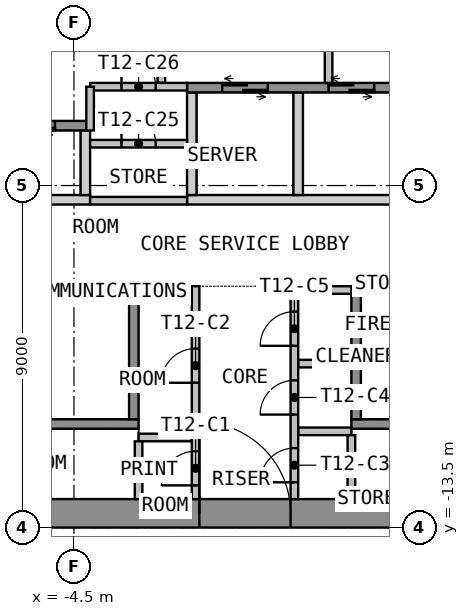
"""IFC4 building model, lengths in metres.
Left out: names, types, materials, properties, quantities, classifications, styles, units other than length and angle.
Written with IfcOpenShell. Run it as: python <this file> out.ifc"""

import sys

from ifc_helpers import new_model, si_unit, direction, frame, frame_2d, origin, place, context, subcontext, project, spatial, polyline, rectangle, outline, extrude, element, fill, save


model = new_model("IFC4")
c1 = context("Model", 3, precision=1e-05, world=origin(), true_north=direction((0.0, 1.0)))
c2 = subcontext(c1, "Body", "Model", "MODEL_VIEW")
j1 = project(units=[si_unit("LENGTHUNIT", "METRE"), si_unit("PLANEANGLEUNIT", "RADIAN")], contexts=[c1])
p1 = place(None, origin())
s1 = spatial("IfcSite", under=j1, at=p1, CompositionType="ELEMENT")
p2 = place(p1, origin())
s2 = spatial("IfcBuilding", under=s1, at=p2, CompositionType="ELEMENT")
p3 = place(p2, frame((0.0, 0.0, 167.7)))
s3 = spatial("IfcBuildingStorey", under=s2, at=p3, CompositionType="ELEMENT", Elevation=167.7)
p4 = place(p3, frame((-15.75, -13.125, 0.0), z_axis=(0.0, 0.0, 1.0), x_axis=(1.0, 0.0, 0.0)))
e1 = element("IfcWall", 1, at=p4, inside=s3, PredefinedType="SHEAR", context=c2, shape_type="SweptSolid", body=[
    extrude(rectangle(XDim=31.5, YDim=0.75, at=frame_2d((15.75, 0.0))), origin(), (0.0, 0.0, 1.0), 3.575),
])
p5 = place(p4, frame((14.55, 0.0, 0.0)))
e2 = element("IfcOpeningElement", 2, at=p5, cuts=e1, PredefinedType="OPENING", context=c2, shape_type="SweptSolid", body=[
    extrude(rectangle(XDim=2.4, YDim=2.1, at=frame_2d((1.2, 1.05))), frame((0.0, 0.385, 0.0), z_axis=(0.0, -1.0, 0.0), x_axis=(1.0, 0.0, 0.0)), (0.0, 0.0, 1.0), 0.77),
])
p6 = place(p4, frame((3.3, 0.0, 0.0)))
e3 = element("IfcOpeningElement", 3, at=p6, cuts=e1, PredefinedType="OPENING", context=c2, shape_type="SweptSolid", body=[
    extrude(rectangle(XDim=1.2, YDim=2.1, at=frame_2d((0.6, 1.05))), frame((0.0, 0.385, 0.0), z_axis=(0.0, -1.0, 0.0), x_axis=(1.0, 0.0, 0.0)), (0.0, 0.0, 1.0), 0.77),
])
p7 = place(p4, frame((27.0, 0.0, 0.0)))
e4 = element("IfcOpeningElement", 4, at=p7, cuts=e1, PredefinedType="OPENING", context=c2, shape_type="SweptSolid", body=[
    extrude(rectangle(XDim=1.2, YDim=2.1, at=frame_2d((0.6, 1.05))), frame((0.0, 0.385, 0.0), z_axis=(0.0, -1.0, 0.0), x_axis=(1.0, 0.0, 0.0)), (0.0, 0.0, 1.0), 0.77),
])
p8 = place(p3, origin())
e5 = element("IfcWall", 5, at=p8, inside=s3, PredefinedType="SHEAR", context=c2, shape_type="SweptSolid", body=[
    extrude(outline(polyline([(-12.9, -5.0), (-4.075, -5.0), (-4.075, -4.75), (-12.9, -4.75), (-12.9, -5.0)])), origin(), (0.0, 0.0, 1.0), 3.575),
])
p9 = place(p3, origin())
e6 = element("IfcWall", 6, at=p9, inside=s3, PredefinedType="SHEAR", context=c2, shape_type="SweptSolid", body=[
    extrude(outline(polyline([(-1.525, -5.0), (12.9, -5.0), (12.9, -4.75), (-1.525, -4.75), (-1.525, -5.0)])), origin(), (0.0, 0.0, 1.0), 3.575),
])
p10 = place(p3, origin())
e7 = element("IfcWall", 7, at=p10, inside=s3, PredefinedType="SHEAR", context=c2, shape_type="SweptSolid", body=[
    extrude(outline(polyline([(-4.325, -4.75), (-4.075, -4.75), (-4.075, -3.05), (-4.325, -3.05), (-4.325, -4.75)])), origin(), (0.0, 0.0, 1.0), 3.575),
])
p11 = place(p3, origin())
e8 = element("IfcWall", 8, at=p11, inside=s3, PredefinedType="SHEAR", context=c2, shape_type="SweptSolid", body=[
    extrude(outline(polyline([(-1.525, -4.75), (-1.275, -4.75), (-1.275, -2.05), (-1.525, -2.05), (-1.525, -4.75)])), origin(), (0.0, 0.0, 1.0), 3.575),
])
p12 = place(p3, origin())
e9 = element("IfcWall", 9, at=p12, inside=s3, PredefinedType="SHEAR", context=c2, shape_type="SweptSolid", body=[
    extrude(outline(polyline([(1.275, -4.75), (1.525, -4.75), (1.525, -2.05), (1.275, -2.05), (1.275, -4.75)])), origin(), (0.0, 0.0, 1.0), 3.575),
])
p13 = place(p3, frame((-12.9, -2.925, 0.0), z_axis=(0.0, 0.0, 1.0), x_axis=(1.0, 0.0, 0.0)))
e10 = element("IfcWall", 10, at=p13, inside=s3, PredefinedType="SHEAR", context=c2, shape_type="SweptSolid", body=[
    extrude(rectangle(XDim=8.825, YDim=0.25, at=frame_2d((4.413, 0.0))), origin(), (0.0, 0.0, 1.0), 3.575),
])
p14 = place(p13, frame((1.1, 0.0, 0.0)))
e11 = element("IfcOpeningElement", 11, at=p14, cuts=e10, PredefinedType="OPENING", context=c2, shape_type="SweptSolid", body=[
    extrude(rectangle(XDim=1.2, YDim=2.1, at=frame_2d((0.6, 1.05))), frame((0.0, 0.135, 0.0), z_axis=(0.0, -1.0, 0.0), x_axis=(1.0, 0.0, 0.0)), (0.0, 0.0, 1.0), 0.27),
])
p15 = place(p13, frame((3.9, 0.0, 0.0)))
e12 = element("IfcOpeningElement", 12, at=p15, cuts=e10, PredefinedType="OPENING", context=c2, shape_type="SweptSolid", body=[
    extrude(rectangle(XDim=1.2, YDim=2.1, at=frame_2d((0.6, 1.05))), frame((0.0, 0.135, 0.0), z_axis=(0.0, -1.0, 0.0), x_axis=(1.0, 0.0, 0.0)), (0.0, 0.0, 1.0), 0.27),
])
p16 = place(p13, frame((6.7, 0.0, 0.0)))
e13 = element("IfcOpeningElement", 13, at=p16, cuts=e10, PredefinedType="OPENING", context=c2, shape_type="SweptSolid", body=[
    extrude(rectangle(XDim=1.2, YDim=2.1, at=frame_2d((0.6, 1.05))), frame((0.0, 0.135, 0.0), z_axis=(0.0, -1.0, 0.0), x_axis=(1.0, 0.0, 0.0)), (0.0, 0.0, 1.0), 0.27),
])
p17 = place(p3, frame((-1.525, -1.925, 0.0), z_axis=(0.0, 0.0, 1.0), x_axis=(1.0, 0.0, 0.0)))
e14 = element("IfcWall", 14, at=p17, inside=s3, PredefinedType="SHEAR", context=c2, shape_type="SweptSolid", body=[
    extrude(rectangle(XDim=14.425, YDim=0.25, at=frame_2d((7.212, 0.0))), origin(), (0.0, 0.0, 1.0), 3.575),
])
p18 = place(p17, frame((0.925, 0.0, 0.0)))
e15 = element("IfcOpeningElement", 15, at=p18, cuts=e14, PredefinedType="OPENING", context=c2, shape_type="SweptSolid", body=[
    extrude(rectangle(XDim=1.2, YDim=2.1, at=frame_2d((0.6, 1.05))), frame((0.0, 0.135, 0.0), z_axis=(0.0, -1.0, 0.0), x_axis=(1.0, 0.0, 0.0)), (0.0, 0.0, 1.0), 0.27),
])
p19 = place(p17, frame((3.725, 0.0, 0.0)))
e16 = element("IfcOpeningElement", 16, at=p19, cuts=e14, PredefinedType="OPENING", context=c2, shape_type="SweptSolid", body=[
    extrude(rectangle(XDim=1.2, YDim=2.1, at=frame_2d((0.6, 1.05))), frame((0.0, 0.135, 0.0), z_axis=(0.0, -1.0, 0.0), x_axis=(1.0, 0.0, 0.0)), (0.0, 0.0, 1.0), 0.27),
])
p20 = place(p3, frame((-2.2, -1.8, 0.0), z_axis=(0.0, 0.0, 1.0), x_axis=(0.0, 1.0, 0.0)))
e17 = element("IfcWall", 17, at=p20, inside=s3, PredefinedType="PARTITIONING", context=c2, shape_type="SweptSolid", body=[
    extrude(rectangle(XDim=3.6, YDim=0.2, at=frame_2d((1.8, 0.0))), origin(), (0.0, 0.0, 1.0), 3.575),
])
p21 = place(p20, frame((1.2, 0.0, 0.0)))
e18 = element("IfcOpeningElement", 18, at=p21, cuts=e17, PredefinedType="OPENING", context=c2, shape_type="SweptSolid", body=[
    extrude(rectangle(XDim=1.2, YDim=2.1, at=frame_2d((0.6, 1.05))), frame((0.0, 0.11, 0.0), z_axis=(0.0, -1.0, 0.0), x_axis=(1.0, 0.0, 0.0)), (0.0, 0.0, 1.0), 0.22),
])
p22 = place(p3, frame((2.2, -1.8, 0.0), z_axis=(0.0, 0.0, 1.0), x_axis=(0.0, 1.0, 0.0)))
e19 = element("IfcWall", 19, at=p22, inside=s3, PredefinedType="PARTITIONING", context=c2, shape_type="SweptSolid", body=[
    extrude(rectangle(XDim=3.6, YDim=0.2, at=frame_2d((1.8, 0.0))), origin(), (0.0, 0.0, 1.0), 3.575),
])
p23 = place(p22, frame((1.2, 0.0, 0.0)))
e20 = element("IfcOpeningElement", 20, at=p23, cuts=e19, PredefinedType="OPENING", context=c2, shape_type="SweptSolid", body=[
    extrude(rectangle(XDim=1.2, YDim=2.1, at=frame_2d((0.6, 1.05))), frame((0.0, 0.11, 0.0), z_axis=(0.0, -1.0, 0.0), x_axis=(1.0, 0.0, 0.0)), (0.0, 0.0, 1.0), 0.22),
])
p24 = place(p3, frame((-12.9, -10.775, 0.0), z_axis=(0.0, 0.0, 1.0), x_axis=(1.0, 0.0, 0.0)))
e21 = element("IfcWall", 21, at=p24, inside=s3, PredefinedType="SHEAR", context=c2, shape_type="SweptSolid", body=[
    extrude(rectangle(XDim=10.1, YDim=0.25, at=frame_2d((5.05, 0.0))), origin(), (0.0, 0.0, 1.0), 3.575),
])
p25 = place(p24, frame((0.45, 0.0, 0.0)))
e22 = element("IfcOpeningElement", 22, at=p25, cuts=e21, PredefinedType="OPENING", context=c2, shape_type="SweptSolid", body=[
    extrude(rectangle(XDim=1.2, YDim=2.1, at=frame_2d((0.6, 1.05))), frame((0.0, 0.135, 0.0), z_axis=(0.0, -1.0, 0.0), x_axis=(1.0, 0.0, 0.0)), (0.0, 0.0, 1.0), 0.27),
])
p26 = place(p3, frame((-12.9, -7.275, 0.0), z_axis=(0.0, 0.0, 1.0), x_axis=(1.0, 0.0, 0.0)))
e23 = element("IfcWall", 23, at=p26, inside=s3, PredefinedType="SHEAR", context=c2, shape_type="SweptSolid", body=[
    extrude(rectangle(XDim=10.1, YDim=0.25, at=frame_2d((5.05, 0.0))), origin(), (0.0, 0.0, 1.0), 3.575),
])
p27 = place(p26, frame((0.45, 0.0, 0.0)))
e24 = element("IfcOpeningElement", 24, at=p27, cuts=e23, PredefinedType="OPENING", context=c2, shape_type="SweptSolid", body=[
    extrude(rectangle(XDim=1.2, YDim=2.1, at=frame_2d((0.6, 1.05))), frame((0.0, 0.135, 0.0), z_axis=(0.0, -1.0, 0.0), x_axis=(1.0, 0.0, 0.0)), (0.0, 0.0, 1.0), 0.27),
])
p28 = place(p3, frame((-2.925, -10.65, 0.0), z_axis=(0.0, 0.0, 1.0), x_axis=(0.0, 1.0, 0.0)))
e25 = element("IfcWall", 25, at=p28, inside=s3, PredefinedType="SHEAR", context=c2, shape_type="SweptSolid", body=[
    extrude(rectangle(XDim=3.25, YDim=0.25, at=frame_2d((1.625, 0.0))), origin(), (0.0, 0.0, 1.0), 3.575),
])
p29 = place(p3, frame((2.8, -10.775, 0.0), z_axis=(0.0, 0.0, 1.0), x_axis=(1.0, 0.0, 0.0)))
e26 = element("IfcWall", 26, at=p29, inside=s3, PredefinedType="SHEAR", context=c2, shape_type="SweptSolid", body=[
    extrude(rectangle(XDim=10.1, YDim=0.25, at=frame_2d((5.05, 0.0))), origin(), (0.0, 0.0, 1.0), 3.575),
])
p30 = place(p29, frame((8.45, 0.0, 0.0)))
e27 = element("IfcOpeningElement", 27, at=p30, cuts=e26, PredefinedType="OPENING", context=c2, shape_type="SweptSolid", body=[
    extrude(rectangle(XDim=1.2, YDim=2.1, at=frame_2d((0.6, 1.05))), frame((0.0, 0.135, 0.0), z_axis=(0.0, -1.0, 0.0), x_axis=(1.0, 0.0, 0.0)), (0.0, 0.0, 1.0), 0.27),
])
p31 = place(p3, frame((2.8, -7.275, 0.0), z_axis=(0.0, 0.0, 1.0), x_axis=(1.0, 0.0, 0.0)))
e28 = element("IfcWall", 28, at=p31, inside=s3, PredefinedType="SHEAR", context=c2, shape_type="SweptSolid", body=[
    extrude(rectangle(XDim=10.1, YDim=0.25, at=frame_2d((5.05, 0.0))), origin(), (0.0, 0.0, 1.0), 3.575),
])
p32 = place(p31, frame((8.45, 0.0, 0.0)))
e29 = element("IfcOpeningElement", 29, at=p32, cuts=e28, PredefinedType="OPENING", context=c2, shape_type="SweptSolid", body=[
    extrude(rectangle(XDim=1.2, YDim=2.1, at=frame_2d((0.6, 1.05))), frame((0.0, 0.135, 0.0), z_axis=(0.0, -1.0, 0.0), x_axis=(1.0, 0.0, 0.0)), (0.0, 0.0, 1.0), 0.27),
])
p33 = place(p3, frame((2.925, -10.65, 0.0), z_axis=(0.0, 0.0, 1.0), x_axis=(0.0, 1.0, 0.0)))
e30 = element("IfcWall", 30, at=p33, inside=s3, PredefinedType="SHEAR", context=c2, shape_type="SweptSolid", body=[
    extrude(rectangle(XDim=3.25, YDim=0.25, at=frame_2d((1.625, 0.0))), origin(), (0.0, 0.0, 1.0), 3.575),
])
for number, where, z_axis, x_axis in (
    (31, (-2.8, -7.25, 0.0), (0.0, 0.0, 1.0), (1.0, 0.0, 0.0)),
    (32, (-2.8, -11.13, 0.0), (0.0, 0.0, 1.0), (1.0, 0.0, 0.0)),
    (33, (1.4, -7.25, 0.0), (0.0, 0.0, 1.0), (1.0, 0.0, 0.0)),
    (34, (1.4, -9.186, 0.0), (0.0, 0.0, 1.0), (1.0, 0.0, 0.0)),
    (35, (1.4, -10.968, 0.0), (0.0, 0.0, 1.0), (1.0, 0.0, 0.0)),
):
    element("IfcWall", number, at=place(p3, frame(where, z_axis=z_axis, x_axis=x_axis)), inside=s3, PredefinedType="PARTITIONING", context=c2, shape_type="SweptSolid", body=[
        extrude(rectangle(XDim=1.4, YDim=0.2, at=frame_2d((0.7, 0.0))), origin(), (0.0, 0.0, 1.0), 3.575),
    ])
p34 = place(p3, frame((-1.3, -12.75, 0.0), z_axis=(0.0, 0.0, 1.0), x_axis=(0.0, 1.0, 0.0)))
e36 = element("IfcWall", 36, at=p34, inside=s3, PredefinedType="PARTITIONING", context=c2, shape_type="SweptSolid", body=[
    extrude(rectangle(XDim=5.6, YDim=0.2, at=frame_2d((2.8, 0.0))), origin(), (0.0, 0.0, 1.0), 3.575),
])
p35 = place(p34, frame((0.36, 0.0, 0.0)))
e37 = element("IfcOpeningElement", 37, at=p35, cuts=e36, PredefinedType="OPENING", context=c2, shape_type="SweptSolid", body=[
    extrude(rectangle(XDim=0.9, YDim=2.1, at=frame_2d((0.45, 1.05))), frame((0.0, 0.11, 0.0), z_axis=(0.0, -1.0, 0.0), x_axis=(1.0, 0.0, 0.0)), (0.0, 0.0, 1.0), 0.22),
])
p36 = place(p34, frame((3.06, 0.0, 0.0)))
e38 = element("IfcOpeningElement", 38, at=p36, cuts=e36, PredefinedType="OPENING", context=c2, shape_type="SweptSolid", body=[
    extrude(rectangle(XDim=0.9, YDim=2.1, at=frame_2d((0.45, 1.05))), frame((0.0, 0.11, 0.0), z_axis=(0.0, -1.0, 0.0), x_axis=(1.0, 0.0, 0.0)), (0.0, 0.0, 1.0), 0.22),
])
p37 = place(p3, frame((1.3, -12.75, 0.0), z_axis=(0.0, 0.0, 1.0), x_axis=(0.0, 1.0, 0.0)))
e39 = element("IfcWall", 39, at=p37, inside=s3, PredefinedType="PARTITIONING", context=c2, shape_type="SweptSolid", body=[
    extrude(rectangle(XDim=5.6, YDim=0.2, at=frame_2d((2.8, 0.0))), origin(), (0.0, 0.0, 1.0), 3.575),
])
p38 = place(p37, frame((0.441, 0.0, 0.0)))
e40 = element("IfcOpeningElement", 40, at=p38, cuts=e39, PredefinedType="OPENING", context=c2, shape_type="SweptSolid", body=[
    extrude(rectangle(XDim=0.9, YDim=2.1, at=frame_2d((0.45, 1.05))), frame((0.0, 0.11, 0.0), z_axis=(0.0, -1.0, 0.0), x_axis=(1.0, 0.0, 0.0)), (0.0, 0.0, 1.0), 0.22),
])
p39 = place(p37, frame((2.223, 0.0, 0.0)))
e41 = element("IfcOpeningElement", 41, at=p39, cuts=e39, PredefinedType="OPENING", context=c2, shape_type="SweptSolid", body=[
    extrude(rectangle(XDim=0.9, YDim=2.1, at=frame_2d((0.45, 1.05))), frame((0.0, 0.11, 0.0), z_axis=(0.0, -1.0, 0.0), x_axis=(1.0, 0.0, 0.0)), (0.0, 0.0, 1.0), 0.22),
])
p40 = place(p37, frame((4.032, 0.0, 0.0)))
e42 = element("IfcOpeningElement", 42, at=p40, cuts=e39, PredefinedType="OPENING", context=c2, shape_type="SweptSolid", body=[
    extrude(rectangle(XDim=0.9, YDim=2.1, at=frame_2d((0.45, 1.05))), frame((0.0, 0.11, 0.0), z_axis=(0.0, -1.0, 0.0), x_axis=(1.0, 0.0, 0.0)), (0.0, 0.0, 1.0), 0.22),
])
p41 = place(p3, frame((-4.075, -3.4, 0.0), z_axis=(0.0, 0.0, 1.0), x_axis=(1.0, 0.0, 0.0)))
e43 = element("IfcWall", 43, at=p41, inside=s3, PredefinedType="PARTITIONING", context=c2, shape_type="SweptSolid", body=[
    extrude(rectangle(XDim=2.55, YDim=0.2, at=frame_2d((1.275, 0.0))), origin(), (0.0, 0.0, 1.0), 3.575),
])
p42 = place(p41, frame((0.825, 0.0, 0.0)))
e44 = element("IfcOpeningElement", 44, at=p42, cuts=e43, PredefinedType="OPENING", context=c2, shape_type="SweptSolid", body=[
    extrude(rectangle(XDim=0.9, YDim=2.1, at=frame_2d((0.45, 1.05))), frame((0.0, 0.11, 0.0), z_axis=(0.0, -1.0, 0.0), x_axis=(1.0, 0.0, 0.0)), (0.0, 0.0, 1.0), 0.22),
])
p43 = place(p3, frame((-4.075, -1.9, 0.0), z_axis=(0.0, 0.0, 1.0), x_axis=(1.0, 0.0, 0.0)))
e45 = element("IfcWall", 45, at=p43, inside=s3, PredefinedType="PARTITIONING", context=c2, shape_type="SweptSolid", body=[
    extrude(rectangle(XDim=2.55, YDim=0.2, at=frame_2d((1.275, 0.0))), origin(), (0.0, 0.0, 1.0), 3.575),
])
p44 = place(p43, frame((0.825, 0.0, 0.0)))
e46 = element("IfcOpeningElement", 46, at=p44, cuts=e45, PredefinedType="OPENING", context=c2, shape_type="SweptSolid", body=[
    extrude(rectangle(XDim=0.9, YDim=2.1, at=frame_2d((0.45, 1.05))), frame((0.0, 0.11, 0.0), z_axis=(0.0, -1.0, 0.0), x_axis=(1.0, 0.0, 0.0)), (0.0, 0.0, 1.0), 0.22),
])
p45 = place(p3, frame((-4.075, -4.9, 0.0), z_axis=(0.0, 0.0, 1.0), x_axis=(1.0, 0.0, 0.0)))
e47 = element("IfcWall", 47, at=p45, inside=s3, PredefinedType="PARTITIONING", context=c2, shape_type="SweptSolid", body=[
    extrude(rectangle(XDim=2.55, YDim=0.2, at=frame_2d((1.275, 0.0))), origin(), (0.0, 0.0, 1.0), 3.575),
])
p46 = place(p3, frame((-4.075, -1.9, 0.0), z_axis=(0.0, 0.0, 1.0), x_axis=(0.0, -1.0, 0.0)))
e48 = element("IfcWall", 48, at=p46, inside=s3, PredefinedType="PARTITIONING", context=c2, shape_type="SweptSolid", body=[
    extrude(rectangle(XDim=1.15, YDim=0.2, at=frame_2d((0.575, 0.0))), origin(), (0.0, 0.0, 1.0), 3.575),
])
p47 = place(p3, frame((-2.8, -12.749, 0.0), z_axis=(0.0, 0.0, 1.0), x_axis=(0.0, 1.0, 0.0)))
e49 = element("IfcWall", 49, at=p47, inside=s3, PredefinedType="PARTITIONING", context=c2, shape_type="SweptSolid", body=[
    extrude(rectangle(XDim=1.518, YDim=0.2, at=frame_2d((0.759, 0.0))), origin(), (0.0, 0.0, 1.0), 3.575),
])
p48 = place(p3, frame((2.8, -12.749, 0.0), z_axis=(0.0, 0.0, 1.0), x_axis=(0.0, 1.0, 0.0)))
e50 = element("IfcWall", 50, at=p48, inside=s3, PredefinedType="PARTITIONING", context=c2, shape_type="SweptSolid", body=[
    extrude(rectangle(XDim=1.68, YDim=0.2, at=frame_2d((0.84, 0.0))), origin(), (0.0, 0.0, 1.0), 3.575),
])
p49 = place(p5, origin())
e51 = element("IfcDoor", 51, at=p49, inside=s3, OperationType="DOUBLE_DOOR_DOUBLE_SWING", PredefinedType="DOOR", context=c2, shape_type="SweptSolid", body=[
    extrude(rectangle(XDim=2.4, YDim=2.1, at=frame_2d((1.2, 1.05))), frame((0.0, 0.025, 0.0), z_axis=(0.0, -1.0, 0.0), x_axis=(1.0, 0.0, 0.0)), (0.0, 0.0, 1.0), 0.05),
])
fill(e2, e51)
p50 = place(p16, origin())
e52 = element("IfcDoor", 52, at=p50, inside=s3, OperationType="DOUBLE_DOOR_SLIDING", PredefinedType="DOOR", context=c2, shape_type="SweptSolid", body=[
    extrude(rectangle(XDim=1.2, YDim=2.1, at=frame_2d((0.6, 1.05))), frame((0.0, 0.025, 0.0), z_axis=(0.0, -1.0, 0.0), x_axis=(1.0, 0.0, 0.0)), (0.0, 0.0, 1.0), 0.05),
])
fill(e13, e52)
p51 = place(p18, origin())
e53 = element("IfcDoor", 53, at=p51, inside=s3, OperationType="DOUBLE_DOOR_SLIDING", PredefinedType="DOOR", context=c2, shape_type="SweptSolid", body=[
    extrude(rectangle(XDim=1.2, YDim=2.1, at=frame_2d((0.6, 1.05))), frame((0.0, 0.025, 0.0), z_axis=(0.0, -1.0, 0.0), x_axis=(1.0, 0.0, 0.0)), (0.0, 0.0, 1.0), 0.05),
])
fill(e15, e53)
p52 = place(p19, origin())
e54 = element("IfcDoor", 54, at=p52, inside=s3, OperationType="DOUBLE_DOOR_SLIDING", PredefinedType="DOOR", context=c2, shape_type="SweptSolid", body=[
    extrude(rectangle(XDim=1.2, YDim=2.1, at=frame_2d((0.6, 1.05))), frame((0.0, 0.025, 0.0), z_axis=(0.0, -1.0, 0.0), x_axis=(1.0, 0.0, 0.0)), (0.0, 0.0, 1.0), 0.05),
])
fill(e16, e54)
p53 = place(p35, origin())
e55 = element("IfcDoor", 55, at=p53, inside=s3, OperationType="SINGLE_SWING_LEFT", PredefinedType="DOOR", context=c2, shape_type="SweptSolid", body=[
    extrude(rectangle(XDim=0.9, YDim=2.1, at=frame_2d((0.45, 1.05))), frame((0.0, 0.025, 0.0), z_axis=(0.0, -1.0, 0.0), x_axis=(1.0, 0.0, 0.0)), (0.0, 0.0, 1.0), 0.05),
])
fill(e37, e55)
p54 = place(p36, origin())
e56 = element("IfcDoor", 56, at=p54, inside=s3, OperationType="SINGLE_SWING_LEFT", PredefinedType="DOOR", context=c2, shape_type="SweptSolid", body=[
    extrude(rectangle(XDim=0.9, YDim=2.1, at=frame_2d((0.45, 1.05))), frame((0.0, 0.025, 0.0), z_axis=(0.0, -1.0, 0.0), x_axis=(1.0, 0.0, 0.0)), (0.0, 0.0, 1.0), 0.05),
])
fill(e38, e56)
p55 = place(p38, origin())
e57 = element("IfcDoor", 57, at=p55, inside=s3, OperationType="SINGLE_SWING_LEFT", PredefinedType="DOOR", context=c2, shape_type="SweptSolid", body=[
    extrude(rectangle(XDim=0.9, YDim=2.1, at=frame_2d((0.45, 1.05))), frame((0.0, 0.025, 0.0), z_axis=(0.0, -1.0, 0.0), x_axis=(1.0, 0.0, 0.0)), (0.0, 0.0, 1.0), 0.05),
])
fill(e40, e57)
p56 = place(p39, origin())
e58 = element("IfcDoor", 58, at=p56, inside=s3, OperationType="SINGLE_SWING_LEFT", PredefinedType="DOOR", context=c2, shape_type="SweptSolid", body=[
    extrude(rectangle(XDim=0.9, YDim=2.1, at=frame_2d((0.45, 1.05))), frame((0.0, 0.025, 0.0), z_axis=(0.0, -1.0, 0.0), x_axis=(1.0, 0.0, 0.0)), (0.0, 0.0, 1.0), 0.05),
])
fill(e41, e58)
p57 = place(p40, origin())
e59 = element("IfcDoor", 59, at=p57, inside=s3, OperationType="SINGLE_SWING_LEFT", PredefinedType="DOOR", context=c2, shape_type="SweptSolid", body=[
    extrude(rectangle(XDim=0.9, YDim=2.1, at=frame_2d((0.45, 1.05))), frame((0.0, 0.025, 0.0), z_axis=(0.0, -1.0, 0.0), x_axis=(1.0, 0.0, 0.0)), (0.0, 0.0, 1.0), 0.05),
])
fill(e42, e59)
p58 = place(p42, origin())
e60 = element("IfcDoor", 60, at=p58, inside=s3, OperationType="SINGLE_SWING_LEFT", PredefinedType="DOOR", context=c2, shape_type="SweptSolid", body=[
    extrude(rectangle(XDim=0.9, YDim=2.1, at=frame_2d((0.45, 1.05))), frame((0.0, 0.025, 0.0), z_axis=(0.0, -1.0, 0.0), x_axis=(1.0, 0.0, 0.0)), (0.0, 0.0, 1.0), 0.05),
])
fill(e44, e60)
p59 = place(p44, origin())
e61 = element("IfcDoor", 61, at=p59, inside=s3, OperationType="SINGLE_SWING_LEFT", PredefinedType="DOOR", context=c2, shape_type="SweptSolid", body=[
    extrude(rectangle(XDim=0.9, YDim=2.1, at=frame_2d((0.45, 1.05))), frame((0.0, 0.025, 0.0), z_axis=(0.0, -1.0, 0.0), x_axis=(1.0, 0.0, 0.0)), (0.0, 0.0, 1.0), 0.05),
])
fill(e46, e61)
save(model, sys.argv[1])
